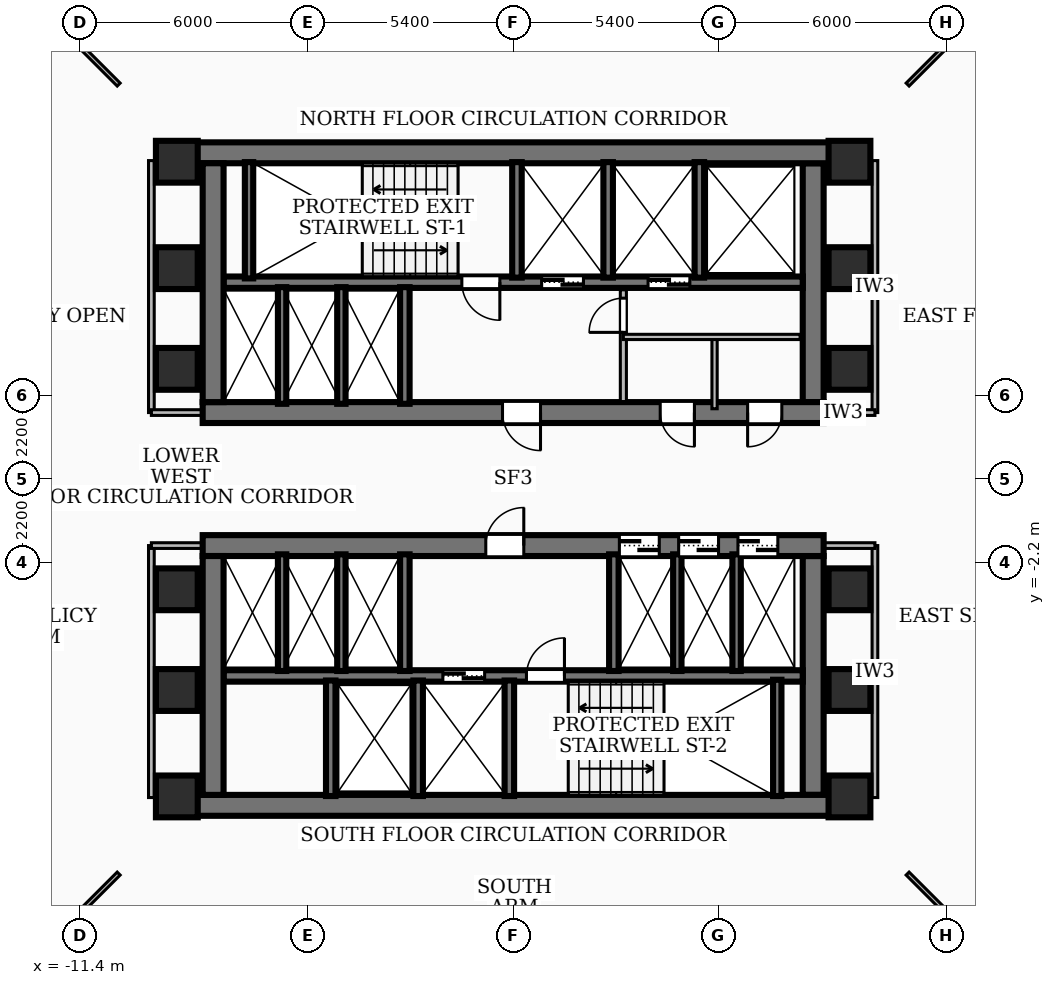
"""IFC4 building model, lengths in metres.
Left out: names, types, materials, properties, quantities, classifications, styles, units other than length and angle.
Written with IfcOpenShell. Run it as: python <this file> out.ifc"""

import sys

from ifc_helpers import new_model, si_unit, direction, frame, frame_2d, origin, origin_2d, place, context, subcontext, project, spatial, rectangle, extrude, element, fill, save


model = new_model("IFC4")
c1 = context("Model", 3, precision=1e-05, world=origin(), true_north=direction((0.0, 1.0)))
c2 = subcontext(c1, "Body", "Model", "MODEL_VIEW")
j1 = project(units=[si_unit("LENGTHUNIT", "METRE"), si_unit("PLANEANGLEUNIT", "RADIAN")], contexts=[c1])
p1 = place(None, origin())
s1 = spatial("IfcSite", under=j1, at=p1, CompositionType="ELEMENT")
p2 = place(p1, origin())
s2 = spatial("IfcBuilding", under=s1, at=p2, CompositionType="ELEMENT")
p3 = place(p2, frame((0.0, 0.0, 28.08)))
s3 = spatial("IfcBuildingStorey", under=s2, at=p3, CompositionType="ELEMENT", Elevation=28.08)
p4 = place(p3, frame((-8.78, 8.585, 0.0), z_axis=(0.0, 0.0, 1.0), x_axis=(1.0, 0.0, 0.0)))
e1 = element("IfcWall", 1, at=p4, inside=s3, PredefinedType="SHEAR", context=c2, shape_type="SweptSolid", body=[
    extrude(rectangle(XDim=17.56, YDim=0.55, at=frame_2d((8.78, 0.0))), origin(), (0.0, 0.0, 1.0), 3.34),
])
p5 = place(p3, frame((8.17, 1.75, 0.0), z_axis=(0.0, 0.0, 1.0), x_axis=(-1.0, 0.0, 0.0)))
e2 = element("IfcWall", 2, at=p5, inside=s3, PredefinedType="SHEAR", context=c2, shape_type="SweptSolid", body=[
    extrude(rectangle(XDim=16.34, YDim=0.55, at=frame_2d((8.17, 0.0))), origin(), (0.0, 0.0, 1.0), 3.34),
])
p6 = place(p5, frame((7.45, 0.0, 0.0)))
e3 = element("IfcOpeningElement", 3, at=p6, cuts=e2, PredefinedType="OPENING", context=c2, shape_type="SweptSolid", body=[
    extrude(rectangle(XDim=1.0, YDim=2.1, at=frame_2d((0.5, 1.05))), frame((0.0, 0.285, 0.0), z_axis=(0.0, -1.0, 0.0), x_axis=(1.0, 0.0, 0.0)), (0.0, 0.0, 1.0), 0.57),
])
p7 = place(p5, frame((3.4, 0.0, 0.0)))
e4 = element("IfcOpeningElement", 4, at=p7, cuts=e2, PredefinedType="OPENING", context=c2, shape_type="SweptSolid", body=[
    extrude(rectangle(XDim=0.9, YDim=2.06, at=frame_2d((0.45, 1.03))), frame((0.0, 0.285, 0.0), z_axis=(0.0, -1.0, 0.0), x_axis=(1.0, 0.0, 0.0)), (0.0, 0.0, 1.0), 0.57),
])
p8 = place(p5, frame((1.1, 0.0, 0.0)))
e5 = element("IfcOpeningElement", 5, at=p8, cuts=e2, PredefinedType="OPENING", context=c2, shape_type="SweptSolid", body=[
    extrude(rectangle(XDim=0.9, YDim=2.06, at=frame_2d((0.45, 1.03))), frame((0.0, 0.285, 0.0), z_axis=(0.0, -1.0, 0.0), x_axis=(1.0, 0.0, 0.0)), (0.0, 0.0, 1.0), 0.57),
])
for number, where, z_axis, x_axis in (
    (6, (-7.895, 2.025, 0.0), (0.0, 0.0, 1.0), (0.0, 1.0, 0.0)),
    (7, (7.895, 8.31, 0.0), (0.0, 0.0, 1.0), (0.0, -1.0, 0.0)),
):
    element("IfcWall", number, at=place(p3, frame(where, z_axis=z_axis, x_axis=x_axis)), inside=s3, PredefinedType="SHEAR", context=c2, shape_type="SweptSolid", body=[
        extrude(rectangle(XDim=6.285, YDim=0.55, at=frame_2d((3.143, 0.0))), origin(), (0.0, 0.0, 1.0), 3.34),
    ])
p9 = place(p3, frame((7.62, 5.18, 0.0), z_axis=(0.0, 0.0, 1.0), x_axis=(-1.0, 0.0, 0.0)))
e8 = element("IfcWall", 8, at=p9, inside=s3, PredefinedType="SOLIDWALL", context=c2, shape_type="SweptSolid", body=[
    extrude(rectangle(XDim=15.24, YDim=0.3, at=frame_2d((7.62, 0.0))), origin(), (0.0, 0.0, 1.0), 3.34),
])
p10 = place(p9, frame((5.77, 0.0, 0.0)))
e9 = element("IfcOpeningElement", 9, at=p10, cuts=e8, PredefinedType="OPENING", context=c2, shape_type="SweptSolid", body=[
    extrude(rectangle(XDim=1.1, YDim=2.15, at=frame_2d((0.55, 1.075))), frame((0.0, 0.16, 0.0), z_axis=(0.0, -1.0, 0.0), x_axis=(1.0, 0.0, 0.0)), (0.0, 0.0, 1.0), 0.32),
])
p11 = place(p9, frame((2.97, 0.0, 0.0)))
e10 = element("IfcOpeningElement", 10, at=p11, cuts=e8, PredefinedType="OPENING", context=c2, shape_type="SweptSolid", body=[
    extrude(rectangle(XDim=1.1, YDim=2.15, at=frame_2d((0.55, 1.075))), frame((0.0, 0.16, 0.0), z_axis=(0.0, -1.0, 0.0), x_axis=(1.0, 0.0, 0.0)), (0.0, 0.0, 1.0), 0.32),
])
p12 = place(p9, frame((7.97, 0.0, 0.0)))
e11 = element("IfcOpeningElement", 11, at=p12, cuts=e8, PredefinedType="OPENING", context=c2, shape_type="SweptSolid", body=[
    extrude(rectangle(XDim=1.0, YDim=2.1, at=frame_2d((0.5, 1.05))), frame((0.0, 0.16, 0.0), z_axis=(0.0, -1.0, 0.0), x_axis=(1.0, 0.0, 0.0)), (0.0, 0.0, 1.0), 0.32),
])
p13 = place(p3, frame((8.78, -8.585, 0.0), z_axis=(0.0, 0.0, 1.0), x_axis=(-1.0, 0.0, 0.0)))
e12 = element("IfcWall", 12, at=p13, inside=s3, PredefinedType="SHEAR", context=c2, shape_type="SweptSolid", body=[
    extrude(rectangle(XDim=17.56, YDim=0.55, at=frame_2d((8.78, 0.0))), origin(), (0.0, 0.0, 1.0), 3.34),
])
p14 = place(p3, frame((-8.17, -1.75, 0.0), z_axis=(0.0, 0.0, 1.0), x_axis=(1.0, 0.0, 0.0)))
e13 = element("IfcWall", 13, at=p14, inside=s3, PredefinedType="SHEAR", context=c2, shape_type="SweptSolid", body=[
    extrude(rectangle(XDim=16.34, YDim=0.55, at=frame_2d((8.17, 0.0))), origin(), (0.0, 0.0, 1.0), 3.34),
])
p15 = place(p14, frame((7.45, 0.0, 0.0)))
e14 = element("IfcOpeningElement", 14, at=p15, cuts=e13, PredefinedType="OPENING", context=c2, shape_type="SweptSolid", body=[
    extrude(rectangle(XDim=1.0, YDim=2.1, at=frame_2d((0.5, 1.05))), frame((0.0, 0.285, 0.0), z_axis=(0.0, -1.0, 0.0), x_axis=(1.0, 0.0, 0.0)), (0.0, 0.0, 1.0), 0.57),
])
p16 = place(p14, frame((10.965, 0.0, 0.0)))
e15 = element("IfcOpeningElement", 15, at=p16, cuts=e13, PredefinedType="OPENING", context=c2, shape_type="SweptSolid", body=[
    extrude(rectangle(XDim=1.05, YDim=2.15, at=frame_2d((0.525, 1.075))), frame((0.0, 0.285, 0.0), z_axis=(0.0, -1.0, 0.0), x_axis=(1.0, 0.0, 0.0)), (0.0, 0.0, 1.0), 0.57),
])
p17 = place(p14, frame((12.525, 0.0, 0.0)))
e16 = element("IfcOpeningElement", 16, at=p17, cuts=e13, PredefinedType="OPENING", context=c2, shape_type="SweptSolid", body=[
    extrude(rectangle(XDim=1.05, YDim=2.15, at=frame_2d((0.525, 1.075))), frame((0.0, 0.285, 0.0), z_axis=(0.0, -1.0, 0.0), x_axis=(1.0, 0.0, 0.0)), (0.0, 0.0, 1.0), 0.57),
])
p18 = place(p14, frame((14.085, 0.0, 0.0)))
e17 = element("IfcOpeningElement", 17, at=p18, cuts=e13, PredefinedType="OPENING", context=c2, shape_type="SweptSolid", body=[
    extrude(rectangle(XDim=1.05, YDim=2.15, at=frame_2d((0.525, 1.075))), frame((0.0, 0.285, 0.0), z_axis=(0.0, -1.0, 0.0), x_axis=(1.0, 0.0, 0.0)), (0.0, 0.0, 1.0), 0.57),
])
for number, where, z_axis, x_axis in (
    (18, (-7.895, -8.31, 0.0), (0.0, 0.0, 1.0), (0.0, 1.0, 0.0)),
    (19, (7.895, -2.025, 0.0), (0.0, 0.0, 1.0), (0.0, -1.0, 0.0)),
):
    element("IfcWall", number, at=place(p3, frame(where, z_axis=z_axis, x_axis=x_axis)), inside=s3, PredefinedType="SHEAR", context=c2, shape_type="SweptSolid", body=[
        extrude(rectangle(XDim=6.285, YDim=0.55, at=frame_2d((3.143, 0.0))), origin(), (0.0, 0.0, 1.0), 3.34),
    ])
p19 = place(p3, frame((-7.62, -5.18, 0.0), z_axis=(0.0, 0.0, 1.0), x_axis=(1.0, 0.0, 0.0)))
e20 = element("IfcWall", 20, at=p19, inside=s3, PredefinedType="SOLIDWALL", context=c2, shape_type="SweptSolid", body=[
    extrude(rectangle(XDim=15.24, YDim=0.3, at=frame_2d((7.62, 0.0))), origin(), (0.0, 0.0, 1.0), 3.34),
])
p20 = place(p19, frame((5.77, 0.0, 0.0)))
e21 = element("IfcOpeningElement", 21, at=p20, cuts=e20, PredefinedType="OPENING", context=c2, shape_type="SweptSolid", body=[
    extrude(rectangle(XDim=1.1, YDim=2.15, at=frame_2d((0.55, 1.075))), frame((0.0, 0.16, 0.0), z_axis=(0.0, -1.0, 0.0), x_axis=(1.0, 0.0, 0.0)), (0.0, 0.0, 1.0), 0.32),
])
p21 = place(p19, frame((7.97, 0.0, 0.0)))
e22 = element("IfcOpeningElement", 22, at=p21, cuts=e20, PredefinedType="OPENING", context=c2, shape_type="SweptSolid", body=[
    extrude(rectangle(XDim=1.0, YDim=2.1, at=frame_2d((0.5, 1.05))), frame((0.0, 0.16, 0.0), z_axis=(0.0, -1.0, 0.0), x_axis=(1.0, 0.0, 0.0)), (0.0, 0.0, 1.0), 0.32),
])
for number, where, z_axis, x_axis in (
    (23, (-6.95, 5.28, 0.0), (0.0, 0.0, 1.0), (0.0, 1.0, 0.0)),
    (24, (6.95, -8.34, 0.0), (0.0, 0.0, 1.0), (0.0, 1.0, 0.0)),
):
    element("IfcWall", number, at=place(p3, frame(where, z_axis=z_axis, x_axis=x_axis)), inside=s3, PredefinedType="SOLIDWALL", context=c2, shape_type="SweptSolid", body=[
        extrude(rectangle(XDim=3.06, YDim=0.22, at=frame_2d((1.53, 0.0))), origin(), (0.0, 0.0, 1.0), 3.34),
    ])
for number, where, z_axis, x_axis in (
    (25, (0.1, 5.3, 0.0), (0.0, 0.0, 1.0), (0.0, 1.0, 0.0)),
    (26, (2.5, 5.3, 0.0), (0.0, 0.0, 1.0), (0.0, 1.0, 0.0)),
    (27, (4.9, 5.3, 0.0), (0.0, 0.0, 1.0), (0.0, 1.0, 0.0)),
):
    element("IfcWall", number, at=place(p3, frame(where, z_axis=z_axis, x_axis=x_axis)), inside=s3, PredefinedType="SOLIDWALL", context=c2, shape_type="SweptSolid", body=[
        extrude(rectangle(XDim=3.04, YDim=0.25, at=frame_2d((1.52, 0.0))), origin(), (0.0, 0.0, 1.0), 3.34),
    ])
p22 = place(p3, frame((-2.85, 1.98, 0.0), z_axis=(0.0, 0.0, 1.0), x_axis=(0.0, 1.0, 0.0)))
e28 = element("IfcWall", 28, at=p22, inside=s3, PredefinedType="SOLIDWALL", context=c2, shape_type="SweptSolid", body=[
    extrude(rectangle(XDim=3.07, YDim=0.25, at=frame_2d((1.535, 0.0))), origin(), (0.0, 0.0, 1.0), 3.34),
])
for number, where, z_axis, x_axis in (
    (29, (-0.1, -8.34, 0.0), (0.0, 0.0, 1.0), (0.0, 1.0, 0.0)),
    (30, (-2.5, -8.34, 0.0), (0.0, 0.0, 1.0), (0.0, 1.0, 0.0)),
    (31, (-4.8, -8.34, 0.0), (0.0, 0.0, 1.0), (0.0, 1.0, 0.0)),
):
    element("IfcWall", number, at=place(p3, frame(where, z_axis=z_axis, x_axis=x_axis)), inside=s3, PredefinedType="SOLIDWALL", context=c2, shape_type="SweptSolid", body=[
        extrude(rectangle(XDim=3.04, YDim=0.25, at=frame_2d((1.52, 0.0))), origin(), (0.0, 0.0, 1.0), 3.34),
    ])
for number, where, z_axis, x_axis in (
    (32, (-2.85, -5.05, 0.0), (0.0, 0.0, 1.0), (0.0, 1.0, 0.0)),
    (33, (2.65, -5.05, 0.0), (0.0, 0.0, 1.0), (0.0, 1.0, 0.0)),
):
    element("IfcWall", number, at=place(p3, frame(where, z_axis=z_axis, x_axis=x_axis)), inside=s3, PredefinedType="SOLIDWALL", context=c2, shape_type="SweptSolid", body=[
        extrude(rectangle(XDim=3.07, YDim=0.25, at=frame_2d((1.535, 0.0))), origin(), (0.0, 0.0, 1.0), 3.34),
    ])
for number, where, z_axis, x_axis in (
    (34, (-6.08, 1.98, 0.0), (0.0, 0.0, 1.0), (0.0, 1.0, 0.0)),
    (35, (-4.52, 1.98, 0.0), (0.0, 0.0, 1.0), (0.0, 1.0, 0.0)),
    (36, (4.32, -5.05, 0.0), (0.0, 0.0, 1.0), (0.0, 1.0, 0.0)),
    (37, (5.88, -5.05, 0.0), (0.0, 0.0, 1.0), (0.0, 1.0, 0.0)),
    (38, (-6.08, -5.05, 0.0), (0.0, 0.0, 1.0), (0.0, 1.0, 0.0)),
    (39, (-4.52, -5.05, 0.0), (0.0, 0.0, 1.0), (0.0, 1.0, 0.0)),
):
    element("IfcWall", number, at=place(p3, frame(where, z_axis=z_axis, x_axis=x_axis)), inside=s3, PredefinedType="SOLIDWALL", context=c2, shape_type="SweptSolid", body=[
        extrude(rectangle(XDim=3.07, YDim=0.22, at=frame_2d((1.535, 0.0))), origin(), (0.0, 0.0, 1.0), 3.34),
    ])
for number, where, z_axis, x_axis in (
    (40, (-8.85, -5.55, 0.0), (0.0, 0.0, 1.0), (1.0, 0.0, 0.0)),
    (41, (-8.85, -2.9, 0.0), (0.0, 0.0, 1.0), (1.0, 0.0, 0.0)),
    (42, (-8.85, 2.9, 0.0), (0.0, 0.0, 1.0), (1.0, 0.0, 0.0)),
    (43, (-8.85, 5.55, 0.0), (0.0, 0.0, 1.0), (1.0, 0.0, 0.0)),
    (44, (8.85, -5.55, 0.0), (0.0, 0.0, 1.0), (1.0, 0.0, 0.0)),
    (45, (8.85, -2.9, 0.0), (0.0, 0.0, 1.0), (1.0, 0.0, 0.0)),
    (46, (8.85, 2.9, 0.0), (0.0, 0.0, 1.0), (1.0, 0.0, 0.0)),
    (47, (8.85, 5.55, 0.0), (0.0, 0.0, 1.0), (1.0, 0.0, 0.0)),
    (48, (-8.85, 8.35, 0.0), (0.0, 0.0, 1.0), (1.0, 0.0, 0.0)),
    (49, (8.85, -8.35, 0.0), (0.0, 0.0, 1.0), (1.0, 0.0, 0.0)),
    (50, (8.85, 8.35, 0.0), (0.0, 0.0, 1.0), (1.0, 0.0, 0.0)),
    (51, (-8.85, -8.35, 0.0), (0.0, 0.0, 1.0), (1.0, 0.0, 0.0)),
):
    element("IfcColumn", number, at=place(p3, frame(where, z_axis=z_axis, x_axis=x_axis)), inside=s3, PredefinedType="COLUMN", context=c2, shape_type="SweptSolid", body=[
        extrude(rectangle(XDim=1.1, YDim=1.1, at=origin_2d()), origin(), (0.0, 0.0, 1.0), 3.6),
    ])
p23 = place(p3, frame((2.9, 2.04, 0.0), z_axis=(0.0, 0.0, 1.0), x_axis=(0.0, 1.0, 0.0)))
e52 = element("IfcWall", 52, at=p23, inside=s3, PredefinedType="PARTITIONING", context=c2, shape_type="SweptSolid", body=[
    extrude(rectangle(XDim=2.94, YDim=0.16, at=frame_2d((1.47, 0.0))), origin(), (0.0, 0.0, 1.0), 2.405),
])
p24 = place(p23, frame((1.82, 0.0, 0.0)))
e53 = element("IfcOpeningElement", 53, at=p24, cuts=e52, PredefinedType="OPENING", context=c2, shape_type="SweptSolid", body=[
    extrude(rectangle(XDim=0.9, YDim=2.06, at=frame_2d((0.45, 1.03))), frame((0.0, 0.09, 0.0), z_axis=(0.0, -1.0, 0.0), x_axis=(1.0, 0.0, 0.0)), (0.0, 0.0, 1.0), 0.18),
])
p25 = place(p3, frame((2.9, 3.74, 0.0), z_axis=(0.0, 0.0, 1.0), x_axis=(1.0, 0.0, 0.0)))
e54 = element("IfcWall", 54, at=p25, inside=s3, PredefinedType="PARTITIONING", context=c2, shape_type="SweptSolid", body=[
    extrude(rectangle(XDim=4.65, YDim=0.138, at=frame_2d((2.325, 0.0))), origin(), (0.0, 0.0, 1.0), 3.34),
])
p26 = place(p3, frame((5.3, 1.85, 0.0), z_axis=(0.0, 0.0, 1.0), x_axis=(0.0, 1.0, 0.0)))
e55 = element("IfcWall", 55, at=p26, inside=s3, PredefinedType="PARTITIONING", context=c2, shape_type="SweptSolid", body=[
    extrude(rectangle(XDim=1.89, YDim=0.138, at=frame_2d((0.945, 0.0))), origin(), (0.0, 0.0, 1.0), 2.405),
])
p27 = place(p3, frame((-9.52, 1.75, 0.0), z_axis=(0.0, 0.0, 1.0), x_axis=(0.0, 1.0, 0.0)))
e56 = element("IfcWall", 56, at=p27, inside=s3, PredefinedType="PARTITIONING", context=c2, shape_type="SweptSolid", body=[
    extrude(rectangle(XDim=6.63, YDim=0.15, at=frame_2d((3.315, 0.0))), origin(), (0.0, 0.0, 1.0), 2.421),
])
p28 = place(p3, frame((-7.85, 1.75, 0.0), z_axis=(0.0, 0.0, 1.0), x_axis=(-1.0, 0.0, 0.0)))
e57 = element("IfcWall", 57, at=p28, inside=s3, PredefinedType="PARTITIONING", context=c2, shape_type="SweptSolid", body=[
    extrude(rectangle(XDim=1.67, YDim=0.15, at=frame_2d((0.835, 0.0))), origin(), (0.0, 0.0, 1.0), 2.405),
])
p29 = place(p3, frame((-9.52, -8.38, 0.0), z_axis=(0.0, 0.0, 1.0), x_axis=(0.0, 1.0, 0.0)))
e58 = element("IfcWall", 58, at=p29, inside=s3, PredefinedType="PARTITIONING", context=c2, shape_type="SweptSolid", body=[
    extrude(rectangle(XDim=6.63, YDim=0.15, at=frame_2d((3.315, 0.0))), origin(), (0.0, 0.0, 1.0), 2.421),
])
p30 = place(p3, frame((-7.85, -1.75, 0.0), z_axis=(0.0, 0.0, 1.0), x_axis=(-1.0, 0.0, 0.0)))
e59 = element("IfcWall", 59, at=p30, inside=s3, PredefinedType="PARTITIONING", context=c2, shape_type="SweptSolid", body=[
    extrude(rectangle(XDim=1.67, YDim=0.15, at=frame_2d((0.835, 0.0))), origin(), (0.0, 0.0, 1.0), 2.405),
])
p31 = place(p3, frame((9.52, 1.75, 0.0), z_axis=(0.0, 0.0, 1.0), x_axis=(0.0, 1.0, 0.0)))
e60 = element("IfcWall", 60, at=p31, inside=s3, PredefinedType="PARTITIONING", context=c2, shape_type="SweptSolid", body=[
    extrude(rectangle(XDim=6.63, YDim=0.15, at=frame_2d((3.315, 0.0))), origin(), (0.0, 0.0, 1.0), 2.421),
])
p32 = place(p3, frame((7.85, 1.75, 0.0), z_axis=(0.0, 0.0, 1.0), x_axis=(1.0, 0.0, 0.0)))
e61 = element("IfcWall", 61, at=p32, inside=s3, PredefinedType="PARTITIONING", context=c2, shape_type="SweptSolid", body=[
    extrude(rectangle(XDim=1.67, YDim=0.15, at=frame_2d((0.835, 0.0))), origin(), (0.0, 0.0, 1.0), 2.405),
])
p33 = place(p3, frame((9.52, -8.38, 0.0), z_axis=(0.0, 0.0, 1.0), x_axis=(0.0, 1.0, 0.0)))
e62 = element("IfcWall", 62, at=p33, inside=s3, PredefinedType="PARTITIONING", context=c2, shape_type="SweptSolid", body=[
    extrude(rectangle(XDim=6.63, YDim=0.15, at=frame_2d((3.315, 0.0))), origin(), (0.0, 0.0, 1.0), 2.421),
])
p34 = place(p3, frame((7.85, -1.75, 0.0), z_axis=(0.0, 0.0, 1.0), x_axis=(1.0, 0.0, 0.0)))
e63 = element("IfcWall", 63, at=p34, inside=s3, PredefinedType="PARTITIONING", context=c2, shape_type="SweptSolid", body=[
    extrude(rectangle(XDim=1.67, YDim=0.15, at=frame_2d((0.835, 0.0))), origin(), (0.0, 0.0, 1.0), 2.405),
])
for number, where, z_axis, x_axis in (
    (64, (10.38, 10.38, 0.0), (0.0, 0.0, 1.0), (0.707, 0.707, 0.0)),
    (65, (-10.38, 10.38, 0.0), (0.0, 0.0, 1.0), (-0.707, 0.707, 0.0)),
    (66, (-10.38, -10.38, 0.0), (0.0, 0.0, 1.0), (-0.707, -0.707, 0.0)),
    (67, (10.38, -10.38, 0.0), (0.0, 0.0, 1.0), (0.707, -0.707, 0.0)),
):
    element("IfcWall", number, at=place(p3, frame(where, z_axis=z_axis, x_axis=x_axis)), inside=s3, PredefinedType="PARTITIONING", context=c2, shape_type="SweptSolid", body=[
        extrude(rectangle(XDim=4.975, YDim=0.11, at=frame_2d((2.488, 0.0))), origin(), (0.0, 0.0, 1.0), 3.34),
    ])
p35 = place(p6, origin())
e68 = element("IfcDoor", 68, at=p35, inside=s3, OperationType="SINGLE_SWING_LEFT", PredefinedType="DOOR", context=c2, shape_type="SweptSolid", body=[
    extrude(rectangle(XDim=1.0, YDim=2.1, at=frame_2d((0.5, 1.05))), frame((0.0, 0.025, 0.0), z_axis=(0.0, -1.0, 0.0), x_axis=(1.0, 0.0, 0.0)), (0.0, 0.0, 1.0), 0.05),
])
fill(e3, e68)
p36 = place(p15, origin())
e69 = element("IfcDoor", 69, at=p36, inside=s3, OperationType="SINGLE_SWING_RIGHT", PredefinedType="DOOR", context=c2, shape_type="SweptSolid", body=[
    extrude(rectangle(XDim=1.0, YDim=2.1, at=frame_2d((0.5, 1.05))), frame((0.0, 0.025, 0.0), z_axis=(0.0, -1.0, 0.0), x_axis=(1.0, 0.0, 0.0)), (0.0, 0.0, 1.0), 0.05),
])
fill(e14, e69)
p37 = place(p10, origin())
e70 = element("IfcDoor", 70, at=p37, inside=s3, OperationType="DOUBLE_DOOR_SLIDING", PredefinedType="DOOR", context=c2, shape_type="SweptSolid", body=[
    extrude(rectangle(XDim=1.1, YDim=2.15, at=frame_2d((0.55, 1.075))), frame((0.0, 0.025, 0.0), z_axis=(0.0, -1.0, 0.0), x_axis=(1.0, 0.0, 0.0)), (0.0, 0.0, 1.0), 0.05),
])
fill(e9, e70)
p38 = place(p11, origin())
e71 = element("IfcDoor", 71, at=p38, inside=s3, OperationType="DOUBLE_DOOR_SLIDING", PredefinedType="DOOR", context=c2, shape_type="SweptSolid", body=[
    extrude(rectangle(XDim=1.1, YDim=2.15, at=frame_2d((0.55, 1.075))), frame((0.0, 0.025, 0.0), z_axis=(0.0, -1.0, 0.0), x_axis=(1.0, 0.0, 0.0)), (0.0, 0.0, 1.0), 0.05),
])
fill(e10, e71)
p39 = place(p12, origin())
e72 = element("IfcDoor", 72, at=p39, inside=s3, OperationType="SINGLE_SWING_LEFT", PredefinedType="DOOR", context=c2, shape_type="SweptSolid", body=[
    extrude(rectangle(XDim=1.0, YDim=2.1, at=frame_2d((0.5, 1.05))), frame((0.0, 0.025, 0.0), z_axis=(0.0, -1.0, 0.0), x_axis=(1.0, 0.0, 0.0)), (0.0, 0.0, 1.0), 0.05),
])
fill(e11, e72)
p40 = place(p20, origin())
e73 = element("IfcDoor", 73, at=p40, inside=s3, OperationType="DOUBLE_DOOR_SLIDING", PredefinedType="DOOR", context=c2, shape_type="SweptSolid", body=[
    extrude(rectangle(XDim=1.1, YDim=2.15, at=frame_2d((0.55, 1.075))), frame((0.0, 0.025, 0.0), z_axis=(0.0, -1.0, 0.0), x_axis=(1.0, 0.0, 0.0)), (0.0, 0.0, 1.0), 0.05),
])
fill(e21, e73)
p41 = place(p21, origin())
e74 = element("IfcDoor", 74, at=p41, inside=s3, OperationType="SINGLE_SWING_RIGHT", PredefinedType="DOOR", context=c2, shape_type="SweptSolid", body=[
    extrude(rectangle(XDim=1.0, YDim=2.1, at=frame_2d((0.5, 1.05))), frame((0.0, 0.025, 0.0), z_axis=(0.0, -1.0, 0.0), x_axis=(1.0, 0.0, 0.0)), (0.0, 0.0, 1.0), 0.05),
])
fill(e22, e74)
p42 = place(p16, origin())
e75 = element("IfcDoor", 75, at=p42, inside=s3, OperationType="DOUBLE_DOOR_SLIDING", PredefinedType="DOOR", context=c2, shape_type="SweptSolid", body=[
    extrude(rectangle(XDim=1.05, YDim=2.15, at=frame_2d((0.525, 1.075))), frame((0.0, 0.025, 0.0), z_axis=(0.0, -1.0, 0.0), x_axis=(1.0, 0.0, 0.0)), (0.0, 0.0, 1.0), 0.05),
])
fill(e15, e75)
p43 = place(p17, origin())
e76 = element("IfcDoor", 76, at=p43, inside=s3, OperationType="DOUBLE_DOOR_SLIDING", PredefinedType="DOOR", context=c2, shape_type="SweptSolid", body=[
    extrude(rectangle(XDim=1.05, YDim=2.15, at=frame_2d((0.525, 1.075))), frame((0.0, 0.025, 0.0), z_axis=(0.0, -1.0, 0.0), x_axis=(1.0, 0.0, 0.0)), (0.0, 0.0, 1.0), 0.05),
])
fill(e16, e76)
p44 = place(p18, origin())
e77 = element("IfcDoor", 77, at=p44, inside=s3, OperationType="DOUBLE_DOOR_SLIDING", PredefinedType="DOOR", context=c2, shape_type="SweptSolid", body=[
    extrude(rectangle(XDim=1.05, YDim=2.15, at=frame_2d((0.525, 1.075))), frame((0.0, 0.025, 0.0), z_axis=(0.0, -1.0, 0.0), x_axis=(1.0, 0.0, 0.0)), (0.0, 0.0, 1.0), 0.05),
])
fill(e17, e77)
p45 = place(p7, origin())
e78 = element("IfcDoor", 78, at=p45, inside=s3, OperationType="SINGLE_SWING_LEFT", PredefinedType="DOOR", context=c2, shape_type="SweptSolid", body=[
    extrude(rectangle(XDim=0.9, YDim=2.06, at=frame_2d((0.45, 1.03))), frame((0.0, 0.025, 0.0), z_axis=(0.0, -1.0, 0.0), x_axis=(1.0, 0.0, 0.0)), (0.0, 0.0, 1.0), 0.05),
])
fill(e4, e78)
p46 = place(p8, origin())
e79 = element("IfcDoor", 79, at=p46, inside=s3, OperationType="SINGLE_SWING_RIGHT", PredefinedType="DOOR", context=c2, shape_type="SweptSolid", body=[
    extrude(rectangle(XDim=0.9, YDim=2.06, at=frame_2d((0.45, 1.03))), frame((0.0, 0.025, 0.0), z_axis=(0.0, -1.0, 0.0), x_axis=(1.0, 0.0, 0.0)), (0.0, 0.0, 1.0), 0.05),
])
fill(e5, e79)
p47 = place(p24, origin())
e80 = element("IfcDoor", 80, at=p47, inside=s3, OperationType="SINGLE_SWING_LEFT", PredefinedType="DOOR", context=c2, shape_type="SweptSolid", body=[
    extrude(rectangle(XDim=0.9, YDim=2.06, at=frame_2d((0.45, 1.03))), frame((0.0, 0.025, 0.0), z_axis=(0.0, -1.0, 0.0), x_axis=(1.0, 0.0, 0.0)), (0.0, 0.0, 1.0), 0.05),
])
fill(e53, e80)
save(model, sys.argv[1])
